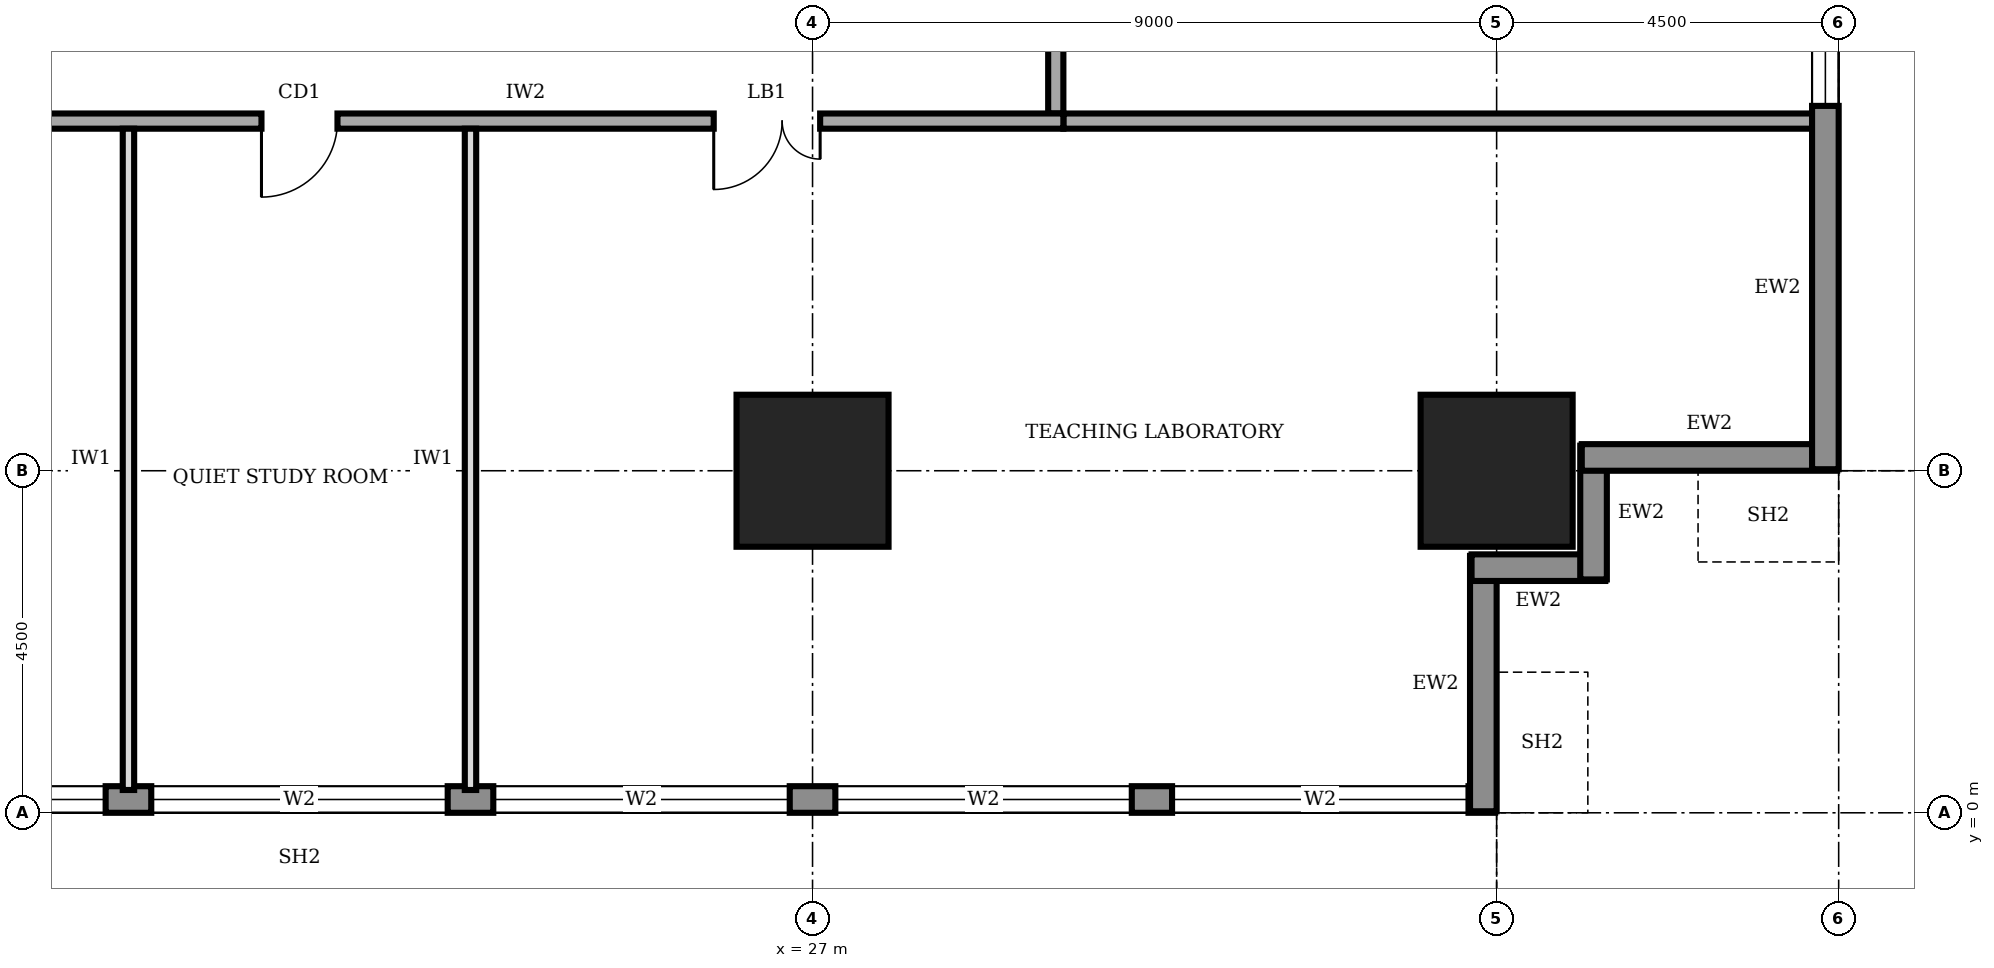
"""IFC4 building model, lengths in metres.
Left out: names, types, materials, properties, quantities, classifications, styles, units other than length and angle.
Written with IfcOpenShell. Run it as: python <this file> out.ifc"""

import sys

from ifc_helpers import new_model, si_unit, direction, frame, frame_2d, origin, origin_2d, place, context, subcontext, project, spatial, rectangle, extrude, element, fill, save


model = new_model("IFC4")
c1 = context("Model", 3, precision=1e-05, world=origin(), true_north=direction((0.0, 1.0)))
c2 = subcontext(c1, "Body", "Model", "MODEL_VIEW")
j1 = project(units=[si_unit("LENGTHUNIT", "METRE"), si_unit("PLANEANGLEUNIT", "RADIAN")], contexts=[c1])
p1 = place(None, origin())
s1 = spatial("IfcSite", under=j1, at=p1, CompositionType="ELEMENT")
p2 = place(p1, origin())
s2 = spatial("IfcBuilding", under=s1, at=p2, CompositionType="ELEMENT")
p3 = place(p2, frame((0.0, 0.0, 61.0)))
s3 = spatial("IfcBuildingStorey", under=s2, at=p3, CompositionType="ELEMENT", Elevation=61.0)
for number, where, z_axis, x_axis in (
    (1, (27.0, 4.5, 0.0), (0.0, 0.0, 1.0), (1.0, 0.0, 0.0)),
    (2, (36.0, 4.5, 0.0), (0.0, 0.0, 1.0), (1.0, 0.0, 0.0)),
):
    element("IfcColumn", number, at=place(p3, frame(where, z_axis=z_axis, x_axis=x_axis)), inside=s3, PredefinedType="COLUMN", context=c2, shape_type="SweptSolid", body=[
        extrude(rectangle(XDim=2.0, YDim=2.0, at=origin_2d()), origin(), (0.0, 0.0, 1.0), 4.0),
    ])
p4 = place(p3, frame((4.52, 0.175, 0.0), z_axis=(0.0, 0.0, 1.0), x_axis=(1.0, 0.0, 0.0)))
e3 = element("IfcWall", 3, at=p4, inside=s3, PredefinedType="STANDARD", context=c2, shape_type="SweptSolid", body=[
    extrude(rectangle(XDim=31.46, YDim=0.35, at=frame_2d((15.73, 0.0))), origin(), (0.0, 0.0, 1.0), 3.75),
])
p5 = place(p4, frame((4.78, 0.0, 0.6)))
e4 = element("IfcOpeningElement", 4, at=p5, cuts=e3, PredefinedType="OPENING", context=c2, shape_type="SweptSolid", body=[
    extrude(rectangle(XDim=3.9, YDim=2.6, at=frame_2d((1.95, 1.3))), frame((0.0, 0.185, 0.0), z_axis=(0.0, -1.0, 0.0), x_axis=(1.0, 0.0, 0.0)), (0.0, 0.0, 1.0), 0.37),
])
p6 = place(p4, frame((9.28, 0.0, 0.6)))
e5 = element("IfcOpeningElement", 5, at=p6, cuts=e3, PredefinedType="OPENING", context=c2, shape_type="SweptSolid", body=[
    extrude(rectangle(XDim=3.9, YDim=2.6, at=frame_2d((1.95, 1.3))), frame((0.0, 0.185, 0.0), z_axis=(0.0, -1.0, 0.0), x_axis=(1.0, 0.0, 0.0)), (0.0, 0.0, 1.0), 0.37),
])
p7 = place(p4, frame((13.78, 0.0, 0.6)))
e6 = element("IfcOpeningElement", 6, at=p7, cuts=e3, PredefinedType="OPENING", context=c2, shape_type="SweptSolid", body=[
    extrude(rectangle(XDim=3.9, YDim=2.6, at=frame_2d((1.95, 1.3))), frame((0.0, 0.185, 0.0), z_axis=(0.0, -1.0, 0.0), x_axis=(1.0, 0.0, 0.0)), (0.0, 0.0, 1.0), 0.37),
])
p8 = place(p4, frame((18.28, 0.0, 0.6)))
e7 = element("IfcOpeningElement", 7, at=p8, cuts=e3, PredefinedType="OPENING", context=c2, shape_type="SweptSolid", body=[
    extrude(rectangle(XDim=3.9, YDim=2.6, at=frame_2d((1.95, 1.3))), frame((0.0, 0.185, 0.0), z_axis=(0.0, -1.0, 0.0), x_axis=(1.0, 0.0, 0.0)), (0.0, 0.0, 1.0), 0.37),
])
p9 = place(p4, frame((22.78, 0.0, 0.6)))
e8 = element("IfcOpeningElement", 8, at=p9, cuts=e3, PredefinedType="OPENING", context=c2, shape_type="SweptSolid", body=[
    extrude(rectangle(XDim=3.9, YDim=2.6, at=frame_2d((1.95, 1.3))), frame((0.0, 0.185, 0.0), z_axis=(0.0, -1.0, 0.0), x_axis=(1.0, 0.0, 0.0)), (0.0, 0.0, 1.0), 0.37),
])
p10 = place(p4, frame((27.21, 0.0, 0.6)))
e9 = element("IfcOpeningElement", 9, at=p10, cuts=e3, PredefinedType="OPENING", context=c2, shape_type="SweptSolid", body=[
    extrude(rectangle(XDim=3.9, YDim=2.6, at=frame_2d((1.95, 1.3))), frame((0.0, 0.185, 0.0), z_axis=(0.0, -1.0, 0.0), x_axis=(1.0, 0.0, 0.0)), (0.0, 0.0, 1.0), 0.37),
])
p11 = place(p3, frame((35.825, 0.02, 0.0), z_axis=(0.0, 0.0, 1.0), x_axis=(0.0, 1.0, 0.0)))
e10 = element("IfcWall", 10, at=p11, inside=s3, PredefinedType="STANDARD", context=c2, shape_type="SweptSolid", body=[
    extrude(rectangle(XDim=3.36, YDim=0.35, at=frame_2d((1.68, 0.0))), origin(), (0.0, 0.0, 1.0), 2.85),
])
for number, where, z_axis, x_axis in (
    (11, (35.67, 3.225, 0.0), (0.0, 0.0, 1.0), (1.0, 0.0, 0.0)),
    (12, (37.275, 3.07, 0.0), (0.0, 0.0, 1.0), (0.0, 1.0, 0.0)),
):
    element("IfcWall", number, at=place(p3, frame(where, z_axis=z_axis, x_axis=x_axis)), inside=s3, PredefinedType="STANDARD", context=c2, shape_type="SweptSolid", body=[
        extrude(rectangle(XDim=1.76, YDim=0.35, at=frame_2d((0.88, 0.0))), origin(), (0.0, 0.0, 1.0), 3.75),
    ])
p12 = place(p3, frame((37.12, 4.675, 0.0), z_axis=(0.0, 0.0, 1.0), x_axis=(1.0, 0.0, 0.0)))
e13 = element("IfcWall", 13, at=p12, inside=s3, PredefinedType="STANDARD", context=c2, shape_type="SweptSolid", body=[
    extrude(rectangle(XDim=3.36, YDim=0.35, at=frame_2d((1.68, 0.0))), origin(), (0.0, 0.0, 1.0), 2.85),
])
p13 = place(p3, frame((40.325, 4.52, 0.0), z_axis=(0.0, 0.0, 1.0), x_axis=(0.0, 1.0, 0.0)))
e14 = element("IfcWall", 14, at=p13, inside=s3, PredefinedType="STANDARD", context=c2, shape_type="SweptSolid", body=[
    extrude(rectangle(XDim=31.46, YDim=0.35, at=frame_2d((15.73, 0.0))), origin(), (0.0, 0.0, 1.0), 3.75),
])
p14 = place(p13, frame((4.78, 0.0, 0.6)))
e15 = element("IfcOpeningElement", 15, at=p14, cuts=e14, PredefinedType="OPENING", context=c2, shape_type="SweptSolid", body=[
    extrude(rectangle(XDim=3.9, YDim=2.6, at=frame_2d((1.95, 1.3))), frame((0.0, 0.185, 0.0), z_axis=(0.0, -1.0, 0.0), x_axis=(1.0, 0.0, 0.0)), (0.0, 0.0, 1.0), 0.37),
])
p15 = place(p13, frame((9.28, 0.0, 0.6)))
e16 = element("IfcOpeningElement", 16, at=p15, cuts=e14, PredefinedType="OPENING", context=c2, shape_type="SweptSolid", body=[
    extrude(rectangle(XDim=3.9, YDim=2.6, at=frame_2d((1.95, 1.3))), frame((0.0, 0.185, 0.0), z_axis=(0.0, -1.0, 0.0), x_axis=(1.0, 0.0, 0.0)), (0.0, 0.0, 1.0), 0.37),
])
p16 = place(p13, frame((13.78, 0.0, 0.6)))
e17 = element("IfcOpeningElement", 17, at=p16, cuts=e14, PredefinedType="OPENING", context=c2, shape_type="SweptSolid", body=[
    extrude(rectangle(XDim=3.9, YDim=2.6, at=frame_2d((1.95, 1.3))), frame((0.0, 0.185, 0.0), z_axis=(0.0, -1.0, 0.0), x_axis=(1.0, 0.0, 0.0)), (0.0, 0.0, 1.0), 0.37),
])
p17 = place(p13, frame((18.28, 0.0, 0.6)))
e18 = element("IfcOpeningElement", 18, at=p17, cuts=e14, PredefinedType="OPENING", context=c2, shape_type="SweptSolid", body=[
    extrude(rectangle(XDim=3.9, YDim=2.6, at=frame_2d((1.95, 1.3))), frame((0.0, 0.185, 0.0), z_axis=(0.0, -1.0, 0.0), x_axis=(1.0, 0.0, 0.0)), (0.0, 0.0, 1.0), 0.37),
])
p18 = place(p13, frame((22.78, 0.0, 0.6)))
e19 = element("IfcOpeningElement", 19, at=p18, cuts=e14, PredefinedType="OPENING", context=c2, shape_type="SweptSolid", body=[
    extrude(rectangle(XDim=3.9, YDim=2.6, at=frame_2d((1.95, 1.3))), frame((0.0, 0.185, 0.0), z_axis=(0.0, -1.0, 0.0), x_axis=(1.0, 0.0, 0.0)), (0.0, 0.0, 1.0), 0.37),
])
p19 = place(p13, frame((27.21, 0.0, 0.6)))
e20 = element("IfcOpeningElement", 20, at=p19, cuts=e14, PredefinedType="OPENING", context=c2, shape_type="SweptSolid", body=[
    extrude(rectangle(XDim=3.9, YDim=2.6, at=frame_2d((1.95, 1.3))), frame((0.0, 0.185, 0.0), z_axis=(0.0, -1.0, 0.0), x_axis=(1.0, 0.0, 0.0)), (0.0, 0.0, 1.0), 0.37),
])
p20 = place(p3, frame((11.9, 9.1, 0.0), z_axis=(0.0, 0.0, 1.0), x_axis=(1.0, 0.0, 0.0)))
e21 = element("IfcWall", 21, at=p20, inside=s3, PredefinedType="SOLIDWALL", context=c2, shape_type="SweptSolid", body=[
    extrude(rectangle(XDim=18.4, YDim=0.2, at=frame_2d((9.2, 0.0))), origin(), (0.0, 0.0, 1.0), 3.75),
])
p21 = place(p20, frame((2.25, 0.0, 0.0)))
e22 = element("IfcOpeningElement", 22, at=p21, cuts=e21, PredefinedType="OPENING", context=c2, shape_type="SweptSolid", body=[
    extrude(rectangle(XDim=1.4, YDim=2.1, at=frame_2d((0.7, 1.05))), frame((0.0, 0.11, 0.0), z_axis=(0.0, -1.0, 0.0), x_axis=(1.0, 0.0, 0.0)), (0.0, 0.0, 1.0), 0.22),
])
p22 = place(p20, frame((7.85, 0.0, 0.0)))
e23 = element("IfcOpeningElement", 23, at=p22, cuts=e21, PredefinedType="OPENING", context=c2, shape_type="SweptSolid", body=[
    extrude(rectangle(XDim=1.0, YDim=2.1, at=frame_2d((0.5, 1.05))), frame((0.0, 0.11, 0.0), z_axis=(0.0, -1.0, 0.0), x_axis=(1.0, 0.0, 0.0)), (0.0, 0.0, 1.0), 0.22),
])
p23 = place(p20, frame((13.8, 0.0, 0.0)))
e24 = element("IfcOpeningElement", 24, at=p23, cuts=e21, PredefinedType="OPENING", context=c2, shape_type="SweptSolid", body=[
    extrude(rectangle(XDim=1.4, YDim=2.1, at=frame_2d((0.7, 1.05))), frame((0.0, 0.11, 0.0), z_axis=(0.0, -1.0, 0.0), x_axis=(1.0, 0.0, 0.0)), (0.0, 0.0, 1.0), 0.22),
])
p24 = place(p3, frame((30.2, 9.2, 0.0), z_axis=(0.0, 0.0, 1.0), x_axis=(0.0, 1.0, 0.0)))
e25 = element("IfcWall", 25, at=p24, inside=s3, PredefinedType="SOLIDWALL", context=c2, shape_type="SweptSolid", body=[
    extrude(rectangle(XDim=22.3, YDim=0.2, at=frame_2d((11.15, 0.0))), origin(), (0.0, 0.0, 1.0), 3.75),
])
p25 = place(p24, frame((5.85, 0.0, 0.0)))
e26 = element("IfcOpeningElement", 26, at=p25, cuts=e25, PredefinedType="OPENING", context=c2, shape_type="SweptSolid", body=[
    extrude(rectangle(XDim=1.4, YDim=2.1, at=frame_2d((0.7, 1.05))), frame((0.0, 0.11, 0.0), z_axis=(0.0, -1.0, 0.0), x_axis=(1.0, 0.0, 0.0)), (0.0, 0.0, 1.0), 0.22),
])
p26 = place(p24, frame((17.3, 0.0, 0.0)))
e27 = element("IfcOpeningElement", 27, at=p26, cuts=e25, PredefinedType="OPENING", context=c2, shape_type="SweptSolid", body=[
    extrude(rectangle(XDim=1.0, YDim=2.1, at=frame_2d((0.5, 1.05))), frame((0.0, 0.11, 0.0), z_axis=(0.0, -1.0, 0.0), x_axis=(1.0, 0.0, 0.0)), (0.0, 0.0, 1.0), 0.22),
])
p27 = place(p3, frame((30.3, 9.1, 0.0), z_axis=(0.0, 0.0, 1.0), x_axis=(1.0, 0.0, 0.0)))
e28 = element("IfcWall", 28, at=p27, inside=s3, PredefinedType="SOLIDWALL", context=c2, shape_type="SweptSolid", body=[
    extrude(rectangle(XDim=9.9, YDim=0.2, at=frame_2d((4.95, 0.0))), origin(), (0.0, 0.0, 1.0), 3.75),
])
for number, where, z_axis, x_axis in (
    (29, (18.0, 0.3, 0.0), (0.0, 0.0, 1.0), (0.0, 1.0, 0.0)),
    (30, (22.5, 0.3, 0.0), (0.0, 0.0, 1.0), (0.0, 1.0, 0.0)),
):
    element("IfcWall", number, at=place(p3, frame(where, z_axis=z_axis, x_axis=x_axis)), inside=s3, PredefinedType="PARTITIONING", context=c2, shape_type="SweptSolid", body=[
        extrude(rectangle(XDim=8.7, YDim=0.15, at=frame_2d((4.35, 0.0))), origin(), (0.0, 0.0, 1.0), 3.75),
    ])
p28 = place(p6, origin())
e31 = element("IfcWindow", 31, at=p28, inside=s3, PartitioningType="SINGLE_PANEL", PredefinedType="WINDOW", context=c2, shape_type="SweptSolid", body=[
    extrude(rectangle(XDim=3.9, YDim=2.6, at=frame_2d((1.95, 1.3))), frame((0.0, 0.03, 0.0), z_axis=(0.0, -1.0, 0.0), x_axis=(1.0, 0.0, 0.0)), (0.0, 0.0, 1.0), 0.06),
])
fill(e5, e31)
p29 = place(p7, origin())
e32 = element("IfcWindow", 32, at=p29, inside=s3, PartitioningType="SINGLE_PANEL", PredefinedType="WINDOW", context=c2, shape_type="SweptSolid", body=[
    extrude(rectangle(XDim=3.9, YDim=2.6, at=frame_2d((1.95, 1.3))), frame((0.0, 0.03, 0.0), z_axis=(0.0, -1.0, 0.0), x_axis=(1.0, 0.0, 0.0)), (0.0, 0.0, 1.0), 0.06),
])
fill(e6, e32)
p30 = place(p8, origin())
e33 = element("IfcWindow", 33, at=p30, inside=s3, PartitioningType="SINGLE_PANEL", PredefinedType="WINDOW", context=c2, shape_type="SweptSolid", body=[
    extrude(rectangle(XDim=3.9, YDim=2.6, at=frame_2d((1.95, 1.3))), frame((0.0, 0.03, 0.0), z_axis=(0.0, -1.0, 0.0), x_axis=(1.0, 0.0, 0.0)), (0.0, 0.0, 1.0), 0.06),
])
fill(e7, e33)
p31 = place(p9, origin())
e34 = element("IfcWindow", 34, at=p31, inside=s3, PartitioningType="SINGLE_PANEL", PredefinedType="WINDOW", context=c2, shape_type="SweptSolid", body=[
    extrude(rectangle(XDim=3.9, YDim=2.6, at=frame_2d((1.95, 1.3))), frame((0.0, 0.03, 0.0), z_axis=(0.0, -1.0, 0.0), x_axis=(1.0, 0.0, 0.0)), (0.0, 0.0, 1.0), 0.06),
])
fill(e8, e34)
p32 = place(p10, origin())
e35 = element("IfcWindow", 35, at=p32, inside=s3, PartitioningType="SINGLE_PANEL", PredefinedType="WINDOW", context=c2, shape_type="SweptSolid", body=[
    extrude(rectangle(XDim=3.9, YDim=2.6, at=frame_2d((1.95, 1.3))), frame((0.0, 0.03, 0.0), z_axis=(0.0, -1.0, 0.0), x_axis=(1.0, 0.0, 0.0)), (0.0, 0.0, 1.0), 0.06),
])
fill(e9, e35)
p33 = place(p14, origin())
e36 = element("IfcWindow", 36, at=p33, inside=s3, PartitioningType="SINGLE_PANEL", PredefinedType="WINDOW", context=c2, shape_type="SweptSolid", body=[
    extrude(rectangle(XDim=3.9, YDim=2.6, at=frame_2d((1.95, 1.3))), frame((0.0, 0.03, 0.0), z_axis=(0.0, -1.0, 0.0), x_axis=(1.0, 0.0, 0.0)), (0.0, 0.0, 1.0), 0.06),
])
fill(e15, e36)
p34 = place(p22, frame((1.0, 0.0, 0.0), z_axis=(0.0, 0.0, 1.0), x_axis=(-1.0, 0.0, 0.0)))
e37 = element("IfcDoor", 37, at=p34, inside=s3, OperationType="SINGLE_SWING_RIGHT", PredefinedType="DOOR", context=c2, shape_type="SweptSolid", body=[
    extrude(rectangle(XDim=1.0, YDim=2.1, at=frame_2d((0.5, 1.05))), frame((0.0, 0.025, 0.0), z_axis=(0.0, -1.0, 0.0), x_axis=(1.0, 0.0, 0.0)), (0.0, 0.0, 1.0), 0.05),
])
fill(e23, e37)
p35 = place(p23, frame((1.4, 0.0, 0.0), z_axis=(0.0, 0.0, 1.0), x_axis=(-1.0, 0.0, 0.0)))
e38 = element("IfcDoor", 38, at=p35, inside=s3, OperationType="DOUBLE_DOOR_SINGLE_SWING", PredefinedType="DOOR", context=c2, shape_type="SweptSolid", body=[
    extrude(rectangle(XDim=1.4, YDim=2.1, at=frame_2d((0.7, 1.05))), frame((0.0, 0.025, 0.0), z_axis=(0.0, -1.0, 0.0), x_axis=(1.0, 0.0, 0.0)), (0.0, 0.0, 1.0), 0.05),
])
fill(e24, e38)
save(model, sys.argv[1])
